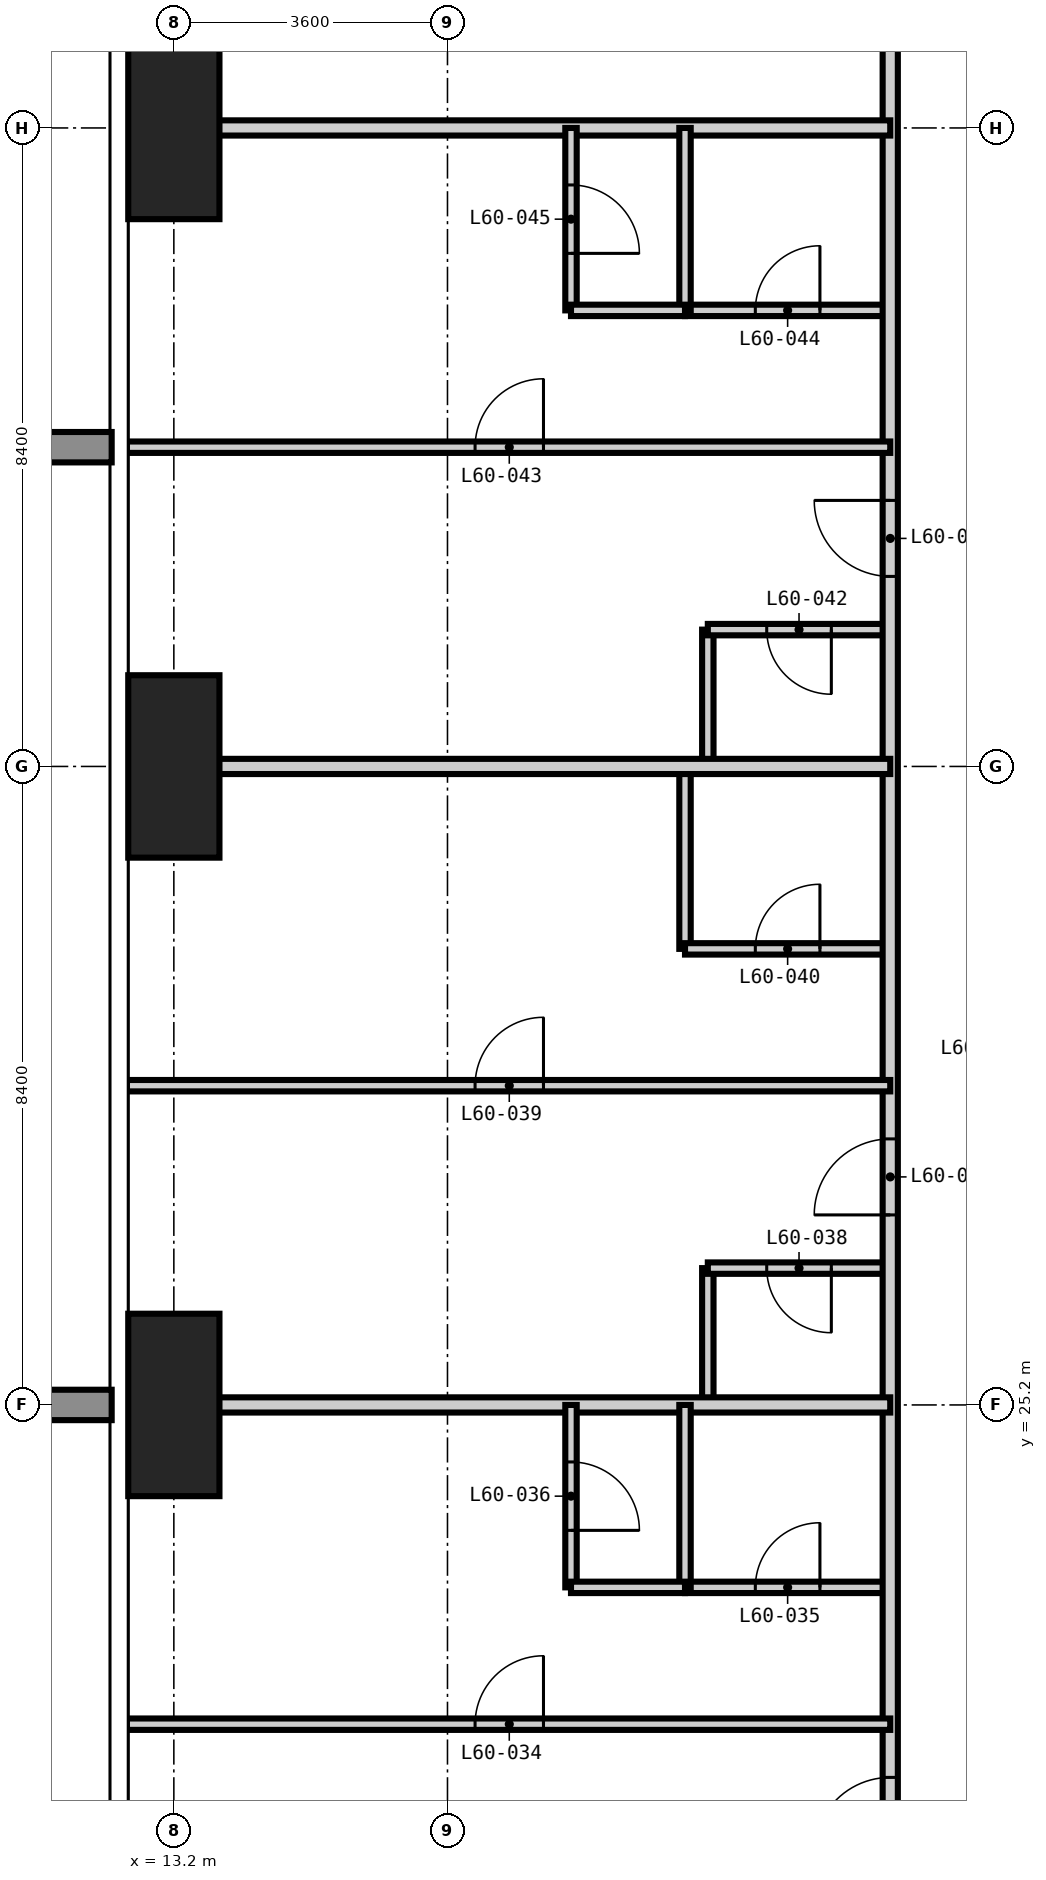
"""IFC4 building model, lengths in metres.
Left out: names, types, materials, properties, quantities, classifications, styles, units other than length and angle.
Written with IfcOpenShell. Run it as: python <this file> out.ifc"""

import sys

from ifc_helpers import new_model, si_unit, direction, frame, frame_2d, origin, origin_2d, place, context, subcontext, project, spatial, rectangle, extrude, element, fill, save


model = new_model("IFC4")
c1 = context("Model", 3, precision=1e-05, world=origin(), true_north=direction((0.0, 1.0)))
c2 = subcontext(c1, "Body", "Model", "MODEL_VIEW")
j1 = project(units=[si_unit("LENGTHUNIT", "METRE"), si_unit("PLANEANGLEUNIT", "RADIAN")], contexts=[c1])
p1 = place(None, origin())
s1 = spatial("IfcSite", under=j1, at=p1, CompositionType="ELEMENT")
p2 = place(p1, origin())
s2 = spatial("IfcBuilding", under=s1, at=p2, CompositionType="ELEMENT")
p3 = place(p2, frame((0.0, 0.0, 233.4)))
s3 = spatial("IfcBuildingStorey", under=s2, at=p3, CompositionType="ELEMENT", Elevation=233.4)
for number, where, z_axis, x_axis in (
    (1, (13.2, 25.2, -0.35), (0.0, 0.0, 1.0), (1.0, 0.0, 0.0)),
    (2, (13.2, 33.6, -0.35), (0.0, 0.0, 1.0), (1.0, 0.0, 0.0)),
    (3, (13.2, 42.0, -0.35), (0.0, 0.0, 1.0), (1.0, 0.0, 0.0)),
):
    element("IfcColumn", number, at=place(p3, frame(where, z_axis=z_axis, x_axis=x_axis)), inside=s3, PredefinedType="COLUMN", context=c2, shape_type="SweptSolid", body=[
        extrude(rectangle(XDim=1.2, YDim=2.4, at=origin_2d()), origin(), (0.0, 0.0, 1.0), 3.9),
    ])
p4 = place(p3, frame((19.925, 31.2, 0.0), z_axis=(0.0, 0.0, 1.0), x_axis=(0.0, 1.0, 0.0)))
e4 = element("IfcWall", 4, at=p4, inside=s3, PredefinedType="PARTITIONING", context=c2, shape_type="SweptSolid", body=[
    extrude(rectangle(XDim=2.4, YDim=0.15, at=frame_2d((1.2, 0.0))), origin(), (0.0, 0.0, 1.0), 3.55),
])
p5 = place(p3, frame((20.225, 25.2, 0.0), z_axis=(0.0, 0.0, 1.0), x_axis=(0.0, 1.0, 0.0)))
e5 = element("IfcWall", 5, at=p5, inside=s3, PredefinedType="PARTITIONING", context=c2, shape_type="SweptSolid", body=[
    extrude(rectangle(XDim=1.8, YDim=0.15, at=frame_2d((0.9, 0.0))), origin(), (0.0, 0.0, 1.0), 3.55),
])
p6 = place(p3, frame((20.225, 33.6, 0.0), z_axis=(0.0, 0.0, 1.0), x_axis=(0.0, 1.0, 0.0)))
e6 = element("IfcWall", 6, at=p6, inside=s3, PredefinedType="PARTITIONING", context=c2, shape_type="SweptSolid", body=[
    extrude(rectangle(XDim=1.8, YDim=0.15, at=frame_2d((0.9, 0.0))), origin(), (0.0, 0.0, 1.0), 3.55),
])
p7 = place(p3, frame((19.925, 22.8, 0.0), z_axis=(0.0, 0.0, 1.0), x_axis=(1.0, 0.0, 0.0)))
e7 = element("IfcWall", 7, at=p7, inside=s3, PredefinedType="PARTITIONING", context=c2, shape_type="SweptSolid", body=[
    extrude(rectangle(XDim=2.7, YDim=0.15, at=frame_2d((1.35, 0.0))), origin(), (0.0, 0.0, 1.0), 3.55),
])
p8 = place(p7, frame((0.925, 0.0, 0.0)))
e8 = element("IfcOpeningElement", 8, at=p8, cuts=e7, PredefinedType="OPENING", context=c2, shape_type="SweptSolid", body=[
    extrude(rectangle(XDim=0.85, YDim=2.1, at=frame_2d((0.425, 1.05))), frame((0.0, 0.085, 0.0), z_axis=(0.0, -1.0, 0.0), x_axis=(1.0, 0.0, 0.0)), (0.0, 0.0, 1.0), 0.17),
])
p9 = place(p3, frame((20.225, 27.0, 0.0), z_axis=(0.0, 0.0, 1.0), x_axis=(1.0, 0.0, 0.0)))
e9 = element("IfcWall", 9, at=p9, inside=s3, PredefinedType="PARTITIONING", context=c2, shape_type="SweptSolid", body=[
    extrude(rectangle(XDim=2.4, YDim=0.15, at=frame_2d((1.2, 0.0))), origin(), (0.0, 0.0, 1.0), 3.55),
])
p10 = place(p9, frame((0.775, 0.0, 0.0)))
e10 = element("IfcOpeningElement", 10, at=p10, cuts=e9, PredefinedType="OPENING", context=c2, shape_type="SweptSolid", body=[
    extrude(rectangle(XDim=0.85, YDim=2.1, at=frame_2d((0.425, 1.05))), frame((0.0, 0.085, 0.0), z_axis=(0.0, -1.0, 0.0), x_axis=(1.0, 0.0, 0.0)), (0.0, 0.0, 1.0), 0.17),
])
p11 = place(p3, frame((19.925, 31.2, 0.0), z_axis=(0.0, 0.0, 1.0), x_axis=(1.0, 0.0, 0.0)))
e11 = element("IfcWall", 11, at=p11, inside=s3, PredefinedType="PARTITIONING", context=c2, shape_type="SweptSolid", body=[
    extrude(rectangle(XDim=2.7, YDim=0.15, at=frame_2d((1.35, 0.0))), origin(), (0.0, 0.0, 1.0), 3.55),
])
p12 = place(p11, frame((0.925, 0.0, 0.0)))
e12 = element("IfcOpeningElement", 12, at=p12, cuts=e11, PredefinedType="OPENING", context=c2, shape_type="SweptSolid", body=[
    extrude(rectangle(XDim=0.85, YDim=2.1, at=frame_2d((0.425, 1.05))), frame((0.0, 0.085, 0.0), z_axis=(0.0, -1.0, 0.0), x_axis=(1.0, 0.0, 0.0)), (0.0, 0.0, 1.0), 0.17),
])
p13 = place(p3, frame((20.225, 35.4, 0.0), z_axis=(0.0, 0.0, 1.0), x_axis=(1.0, 0.0, 0.0)))
e13 = element("IfcWall", 13, at=p13, inside=s3, PredefinedType="PARTITIONING", context=c2, shape_type="SweptSolid", body=[
    extrude(rectangle(XDim=2.4, YDim=0.15, at=frame_2d((1.2, 0.0))), origin(), (0.0, 0.0, 1.0), 3.55),
])
p14 = place(p13, frame((0.775, 0.0, 0.0)))
e14 = element("IfcOpeningElement", 14, at=p14, cuts=e13, PredefinedType="OPENING", context=c2, shape_type="SweptSolid", body=[
    extrude(rectangle(XDim=0.85, YDim=2.1, at=frame_2d((0.425, 1.05))), frame((0.0, 0.085, 0.0), z_axis=(0.0, -1.0, 0.0), x_axis=(1.0, 0.0, 0.0)), (0.0, 0.0, 1.0), 0.17),
])
p15 = place(p3, frame((19.925, 39.6, 0.0), z_axis=(0.0, 0.0, 1.0), x_axis=(1.0, 0.0, 0.0)))
e15 = element("IfcWall", 15, at=p15, inside=s3, PredefinedType="PARTITIONING", context=c2, shape_type="SweptSolid", body=[
    extrude(rectangle(XDim=2.7, YDim=0.15, at=frame_2d((1.35, 0.0))), origin(), (0.0, 0.0, 1.0), 3.55),
])
p16 = place(p15, frame((0.925, 0.0, 0.0)))
e16 = element("IfcOpeningElement", 16, at=p16, cuts=e15, PredefinedType="OPENING", context=c2, shape_type="SweptSolid", body=[
    extrude(rectangle(XDim=0.85, YDim=2.1, at=frame_2d((0.425, 1.05))), frame((0.0, 0.085, 0.0), z_axis=(0.0, -1.0, 0.0), x_axis=(1.0, 0.0, 0.0)), (0.0, 0.0, 1.0), 0.17),
])
p17 = place(p3, frame((22.625, 14.225, 0.0), z_axis=(0.0, 0.0, 1.0), x_axis=(0.0, 1.0, 0.0)))
e17 = element("IfcWall", 17, at=p17, inside=s3, PredefinedType="PARTITIONING", context=c2, shape_type="SweptSolid", body=[
    extrude(rectangle(XDim=30.95, YDim=0.2, at=frame_2d((15.475, 0.0))), origin(), (0.0, 0.0, 1.0), 3.55),
])
p18 = place(p17, frame((5.075, 0.0, 0.0)))
e18 = element("IfcOpeningElement", 18, at=p18, cuts=e17, PredefinedType="OPENING", context=c2, shape_type="SweptSolid", body=[
    extrude(rectangle(XDim=1.0, YDim=2.2, at=frame_2d((0.5, 1.1))), frame((0.0, 0.11, 0.0), z_axis=(0.0, -1.0, 0.0), x_axis=(1.0, 0.0, 0.0)), (0.0, 0.0, 1.0), 0.22),
])
p19 = place(p17, frame((13.475, 0.0, 0.0)))
e19 = element("IfcOpeningElement", 19, at=p19, cuts=e17, PredefinedType="OPENING", context=c2, shape_type="SweptSolid", body=[
    extrude(rectangle(XDim=1.0, YDim=2.2, at=frame_2d((0.5, 1.1))), frame((0.0, 0.11, 0.0), z_axis=(0.0, -1.0, 0.0), x_axis=(1.0, 0.0, 0.0)), (0.0, 0.0, 1.0), 0.22),
])
p20 = place(p17, frame((21.875, 0.0, 0.0)))
e20 = element("IfcOpeningElement", 20, at=p20, cuts=e17, PredefinedType="OPENING", context=c2, shape_type="SweptSolid", body=[
    extrude(rectangle(XDim=1.0, YDim=2.2, at=frame_2d((0.5, 1.1))), frame((0.0, 0.11, 0.0), z_axis=(0.0, -1.0, 0.0), x_axis=(1.0, 0.0, 0.0)), (0.0, 0.0, 1.0), 0.22),
])
p21 = place(p17, frame((0.787, 0.0, 0.0)))
e21 = element("IfcOpeningElement", 21, at=p21, cuts=e17, PredefinedType="OPENING", context=c2, shape_type="SweptSolid", body=[
    extrude(rectangle(XDim=1.0, YDim=2.2, at=frame_2d((0.5, 1.1))), frame((0.0, 0.11, 0.0), z_axis=(0.0, -1.0, 0.0), x_axis=(1.0, 0.0, 0.0)), (0.0, 0.0, 1.0), 0.22),
])
p22 = place(p17, frame((28.862, 0.0, 0.0)))
e22 = element("IfcOpeningElement", 22, at=p22, cuts=e17, PredefinedType="OPENING", context=c2, shape_type="SweptSolid", body=[
    extrude(rectangle(XDim=1.0, YDim=2.2, at=frame_2d((0.5, 1.1))), frame((0.0, 0.11, 0.0), z_axis=(0.0, -1.0, 0.0), x_axis=(1.0, 0.0, 0.0)), (0.0, 0.0, 1.0), 0.22),
])
for number, where, z_axis, x_axis in (
    (23, (12.582, 25.2, 0.0), (0.0, 0.0, 1.0), (1.0, 0.0, 0.0)),
    (24, (12.582, 33.6, 0.0), (0.0, 0.0, 1.0), (1.0, 0.0, 0.0)),
    (25, (12.582, 42.0, 0.0), (0.0, 0.0, 1.0), (1.0, 0.0, 0.0)),
):
    element("IfcWall", number, at=place(p3, frame(where, z_axis=z_axis, x_axis=x_axis)), inside=s3, PredefinedType="PARTITIONING", context=c2, shape_type="SweptSolid", body=[
        extrude(rectangle(XDim=10.043, YDim=0.2, at=frame_2d((5.021, 0.0))), origin(), (0.0, 0.0, 1.0), 3.55),
    ])
p23 = place(p3, frame((18.425, 22.8, 0.0), z_axis=(0.0, 0.0, 1.0), x_axis=(0.0, 1.0, 0.0)))
e26 = element("IfcWall", 26, at=p23, inside=s3, PredefinedType="PARTITIONING", context=c2, shape_type="SweptSolid", body=[
    extrude(rectangle(XDim=2.4, YDim=0.15, at=frame_2d((1.2, 0.0))), origin(), (0.0, 0.0, 1.0), 3.55),
])
p24 = place(p23, frame((0.75, 0.0, 0.0)))
e27 = element("IfcOpeningElement", 27, at=p24, cuts=e26, PredefinedType="OPENING", context=c2, shape_type="SweptSolid", body=[
    extrude(rectangle(XDim=0.9, YDim=2.1, at=frame_2d((0.45, 1.05))), frame((0.0, 0.085, 0.0), z_axis=(0.0, -1.0, 0.0), x_axis=(1.0, 0.0, 0.0)), (0.0, 0.0, 1.0), 0.17),
])
p25 = place(p3, frame((18.425, 39.6, 0.0), z_axis=(0.0, 0.0, 1.0), x_axis=(0.0, 1.0, 0.0)))
e28 = element("IfcWall", 28, at=p25, inside=s3, PredefinedType="PARTITIONING", context=c2, shape_type="SweptSolid", body=[
    extrude(rectangle(XDim=2.4, YDim=0.15, at=frame_2d((1.2, 0.0))), origin(), (0.0, 0.0, 1.0), 3.55),
])
p26 = place(p25, frame((0.75, 0.0, 0.0)))
e29 = element("IfcOpeningElement", 29, at=p26, cuts=e28, PredefinedType="OPENING", context=c2, shape_type="SweptSolid", body=[
    extrude(rectangle(XDim=0.9, YDim=2.1, at=frame_2d((0.45, 1.05))), frame((0.0, 0.085, 0.0), z_axis=(0.0, -1.0, 0.0), x_axis=(1.0, 0.0, 0.0)), (0.0, 0.0, 1.0), 0.17),
])
for number, where, z_axis, x_axis in (
    (30, (19.925, 22.8, 0.0), (0.0, 0.0, 1.0), (0.0, 1.0, 0.0)),
    (31, (19.925, 39.6, 0.0), (0.0, 0.0, 1.0), (0.0, 1.0, 0.0)),
):
    element("IfcWall", number, at=place(p3, frame(where, z_axis=z_axis, x_axis=x_axis)), inside=s3, PredefinedType="PARTITIONING", context=c2, shape_type="SweptSolid", body=[
        extrude(rectangle(XDim=2.4, YDim=0.15, at=frame_2d((1.2, 0.0))), origin(), (0.0, 0.0, 1.0), 3.55),
    ])
p27 = place(p3, frame((12.582, 21.0, 0.0), z_axis=(0.0, 0.0, 1.0), x_axis=(1.0, 0.0, 0.0)))
e32 = element("IfcWall", 32, at=p27, inside=s3, PredefinedType="PARTITIONING", context=c2, shape_type="SweptSolid", body=[
    extrude(rectangle(XDim=10.043, YDim=0.15, at=frame_2d((5.021, 0.0))), origin(), (0.0, 0.0, 1.0), 3.55),
])
p28 = place(p27, frame((4.581, 0.0, 0.0)))
e33 = element("IfcOpeningElement", 33, at=p28, cuts=e32, PredefinedType="OPENING", context=c2, shape_type="SweptSolid", body=[
    extrude(rectangle(XDim=0.9, YDim=2.1, at=frame_2d((0.45, 1.05))), frame((0.0, 0.085, 0.0), z_axis=(0.0, -1.0, 0.0), x_axis=(1.0, 0.0, 0.0)), (0.0, 0.0, 1.0), 0.17),
])
p29 = place(p3, frame((18.425, 22.8, 0.0), z_axis=(0.0, 0.0, 1.0), x_axis=(1.0, 0.0, 0.0)))
e34 = element("IfcWall", 34, at=p29, inside=s3, PredefinedType="PARTITIONING", context=c2, shape_type="SweptSolid", body=[
    extrude(rectangle(XDim=1.5, YDim=0.15, at=frame_2d((0.75, 0.0))), origin(), (0.0, 0.0, 1.0), 3.55),
])
p30 = place(p3, frame((12.582, 29.4, 0.0), z_axis=(0.0, 0.0, 1.0), x_axis=(1.0, 0.0, 0.0)))
e35 = element("IfcWall", 35, at=p30, inside=s3, PredefinedType="PARTITIONING", context=c2, shape_type="SweptSolid", body=[
    extrude(rectangle(XDim=10.043, YDim=0.15, at=frame_2d((5.021, 0.0))), origin(), (0.0, 0.0, 1.0), 3.55),
])
p31 = place(p30, frame((4.581, 0.0, 0.0)))
e36 = element("IfcOpeningElement", 36, at=p31, cuts=e35, PredefinedType="OPENING", context=c2, shape_type="SweptSolid", body=[
    extrude(rectangle(XDim=0.9, YDim=2.1, at=frame_2d((0.45, 1.05))), frame((0.0, 0.085, 0.0), z_axis=(0.0, -1.0, 0.0), x_axis=(1.0, 0.0, 0.0)), (0.0, 0.0, 1.0), 0.17),
])
p32 = place(p3, frame((12.582, 37.8, 0.0), z_axis=(0.0, 0.0, 1.0), x_axis=(1.0, 0.0, 0.0)))
e37 = element("IfcWall", 37, at=p32, inside=s3, PredefinedType="PARTITIONING", context=c2, shape_type="SweptSolid", body=[
    extrude(rectangle(XDim=10.043, YDim=0.15, at=frame_2d((5.021, 0.0))), origin(), (0.0, 0.0, 1.0), 3.55),
])
p33 = place(p32, frame((4.581, 0.0, 0.0)))
e38 = element("IfcOpeningElement", 38, at=p33, cuts=e37, PredefinedType="OPENING", context=c2, shape_type="SweptSolid", body=[
    extrude(rectangle(XDim=0.9, YDim=2.1, at=frame_2d((0.45, 1.05))), frame((0.0, 0.085, 0.0), z_axis=(0.0, -1.0, 0.0), x_axis=(1.0, 0.0, 0.0)), (0.0, 0.0, 1.0), 0.17),
])
p34 = place(p3, frame((18.425, 39.6, 0.0), z_axis=(0.0, 0.0, 1.0), x_axis=(1.0, 0.0, 0.0)))
e39 = element("IfcWall", 39, at=p34, inside=s3, PredefinedType="PARTITIONING", context=c2, shape_type="SweptSolid", body=[
    extrude(rectangle(XDim=1.5, YDim=0.15, at=frame_2d((0.75, 0.0))), origin(), (0.0, 0.0, 1.0), 3.55),
])
p35 = place(p18, origin())
e40 = element("IfcDoor", 40, at=p35, inside=s3, OperationType="SINGLE_SWING_LEFT", PredefinedType="DOOR", context=c2, shape_type="SweptSolid", body=[
    extrude(rectangle(XDim=1.0, YDim=2.2, at=frame_2d((0.5, 1.1))), frame((0.0, 0.025, 0.0), z_axis=(0.0, -1.0, 0.0), x_axis=(1.0, 0.0, 0.0)), (0.0, 0.0, 1.0), 0.05),
])
fill(e18, e40)
p36 = place(p28, origin())
e41 = element("IfcDoor", 41, at=p36, inside=s3, OperationType="SINGLE_SWING_RIGHT", PredefinedType="DOOR", context=c2, shape_type="SweptSolid", body=[
    extrude(rectangle(XDim=0.9, YDim=2.1, at=frame_2d((0.45, 1.05))), frame((0.0, 0.025, 0.0), z_axis=(0.0, -1.0, 0.0), x_axis=(1.0, 0.0, 0.0)), (0.0, 0.0, 1.0), 0.05),
])
fill(e33, e41)
p37 = place(p8, origin())
e42 = element("IfcDoor", 42, at=p37, inside=s3, OperationType="SINGLE_SWING_RIGHT", PredefinedType="DOOR", context=c2, shape_type="SweptSolid", body=[
    extrude(rectangle(XDim=0.85, YDim=2.1, at=frame_2d((0.425, 1.05))), frame((0.0, 0.025, 0.0), z_axis=(0.0, -1.0, 0.0), x_axis=(1.0, 0.0, 0.0)), (0.0, 0.0, 1.0), 0.05),
])
fill(e8, e42)
p38 = place(p24, frame((0.9, 0.0, 0.0), z_axis=(0.0, 0.0, 1.0), x_axis=(-1.0, 0.0, 0.0)))
e43 = element("IfcDoor", 43, at=p38, inside=s3, OperationType="SINGLE_SWING_RIGHT", PredefinedType="DOOR", context=c2, shape_type="SweptSolid", body=[
    extrude(rectangle(XDim=0.9, YDim=2.1, at=frame_2d((0.45, 1.05))), frame((0.0, 0.025, 0.0), z_axis=(0.0, -1.0, 0.0), x_axis=(1.0, 0.0, 0.0)), (0.0, 0.0, 1.0), 0.05),
])
fill(e27, e43)
p39 = place(p19, origin())
e44 = element("IfcDoor", 44, at=p39, inside=s3, OperationType="SINGLE_SWING_LEFT", PredefinedType="DOOR", context=c2, shape_type="SweptSolid", body=[
    extrude(rectangle(XDim=1.0, YDim=2.2, at=frame_2d((0.5, 1.1))), frame((0.0, 0.025, 0.0), z_axis=(0.0, -1.0, 0.0), x_axis=(1.0, 0.0, 0.0)), (0.0, 0.0, 1.0), 0.05),
])
fill(e19, e44)
p40 = place(p10, frame((0.85, 0.0, 0.0), z_axis=(0.0, 0.0, 1.0), x_axis=(-1.0, 0.0, 0.0)))
e45 = element("IfcDoor", 45, at=p40, inside=s3, OperationType="SINGLE_SWING_LEFT", PredefinedType="DOOR", context=c2, shape_type="SweptSolid", body=[
    extrude(rectangle(XDim=0.85, YDim=2.1, at=frame_2d((0.425, 1.05))), frame((0.0, 0.025, 0.0), z_axis=(0.0, -1.0, 0.0), x_axis=(1.0, 0.0, 0.0)), (0.0, 0.0, 1.0), 0.05),
])
fill(e10, e45)
p41 = place(p31, origin())
e46 = element("IfcDoor", 46, at=p41, inside=s3, OperationType="SINGLE_SWING_RIGHT", PredefinedType="DOOR", context=c2, shape_type="SweptSolid", body=[
    extrude(rectangle(XDim=0.9, YDim=2.1, at=frame_2d((0.45, 1.05))), frame((0.0, 0.025, 0.0), z_axis=(0.0, -1.0, 0.0), x_axis=(1.0, 0.0, 0.0)), (0.0, 0.0, 1.0), 0.05),
])
fill(e36, e46)
p42 = place(p12, origin())
e47 = element("IfcDoor", 47, at=p42, inside=s3, OperationType="SINGLE_SWING_RIGHT", PredefinedType="DOOR", context=c2, shape_type="SweptSolid", body=[
    extrude(rectangle(XDim=0.85, YDim=2.1, at=frame_2d((0.425, 1.05))), frame((0.0, 0.025, 0.0), z_axis=(0.0, -1.0, 0.0), x_axis=(1.0, 0.0, 0.0)), (0.0, 0.0, 1.0), 0.05),
])
fill(e12, e47)
p43 = place(p20, origin())
e48 = element("IfcDoor", 48, at=p43, inside=s3, OperationType="SINGLE_SWING_RIGHT", PredefinedType="DOOR", context=c2, shape_type="SweptSolid", body=[
    extrude(rectangle(XDim=1.0, YDim=2.2, at=frame_2d((0.5, 1.1))), frame((0.0, 0.025, 0.0), z_axis=(0.0, -1.0, 0.0), x_axis=(1.0, 0.0, 0.0)), (0.0, 0.0, 1.0), 0.05),
])
fill(e20, e48)
p44 = place(p14, frame((0.85, 0.0, 0.0), z_axis=(0.0, 0.0, 1.0), x_axis=(-1.0, 0.0, 0.0)))
e49 = element("IfcDoor", 49, at=p44, inside=s3, OperationType="SINGLE_SWING_LEFT", PredefinedType="DOOR", context=c2, shape_type="SweptSolid", body=[
    extrude(rectangle(XDim=0.85, YDim=2.1, at=frame_2d((0.425, 1.05))), frame((0.0, 0.025, 0.0), z_axis=(0.0, -1.0, 0.0), x_axis=(1.0, 0.0, 0.0)), (0.0, 0.0, 1.0), 0.05),
])
fill(e14, e49)
p45 = place(p33, origin())
e50 = element("IfcDoor", 50, at=p45, inside=s3, OperationType="SINGLE_SWING_RIGHT", PredefinedType="DOOR", context=c2, shape_type="SweptSolid", body=[
    extrude(rectangle(XDim=0.9, YDim=2.1, at=frame_2d((0.45, 1.05))), frame((0.0, 0.025, 0.0), z_axis=(0.0, -1.0, 0.0), x_axis=(1.0, 0.0, 0.0)), (0.0, 0.0, 1.0), 0.05),
])
fill(e38, e50)
p46 = place(p16, origin())
e51 = element("IfcDoor", 51, at=p46, inside=s3, OperationType="SINGLE_SWING_RIGHT", PredefinedType="DOOR", context=c2, shape_type="SweptSolid", body=[
    extrude(rectangle(XDim=0.85, YDim=2.1, at=frame_2d((0.425, 1.05))), frame((0.0, 0.025, 0.0), z_axis=(0.0, -1.0, 0.0), x_axis=(1.0, 0.0, 0.0)), (0.0, 0.0, 1.0), 0.05),
])
fill(e16, e51)
p47 = place(p26, frame((0.9, 0.0, 0.0), z_axis=(0.0, 0.0, 1.0), x_axis=(-1.0, 0.0, 0.0)))
e52 = element("IfcDoor", 52, at=p47, inside=s3, OperationType="SINGLE_SWING_RIGHT", PredefinedType="DOOR", context=c2, shape_type="SweptSolid", body=[
    extrude(rectangle(XDim=0.9, YDim=2.1, at=frame_2d((0.45, 1.05))), frame((0.0, 0.025, 0.0), z_axis=(0.0, -1.0, 0.0), x_axis=(1.0, 0.0, 0.0)), (0.0, 0.0, 1.0), 0.05),
])
fill(e29, e52)
save(model, sys.argv[1])
